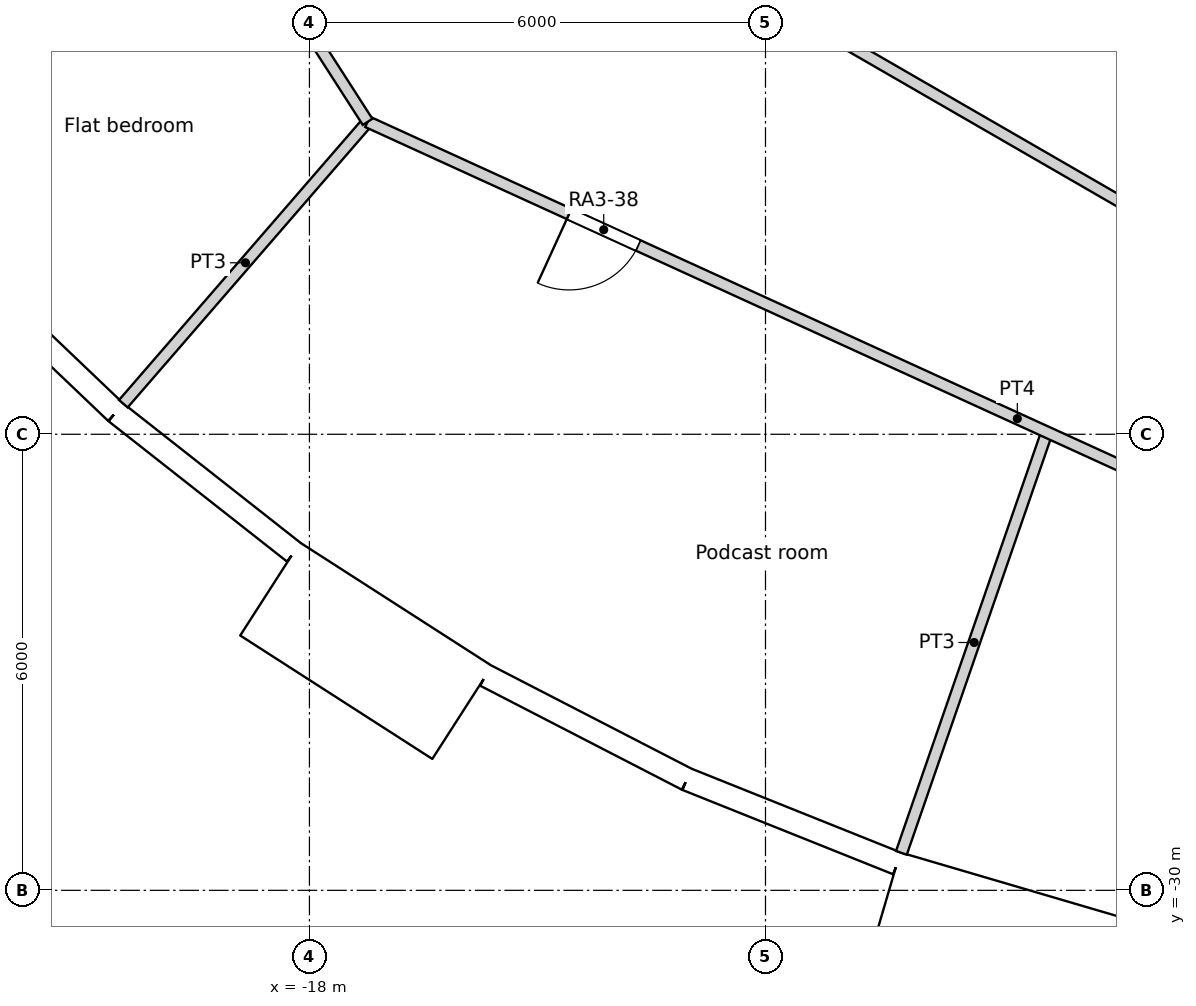
"""IFC4 building model, lengths in metres.
Left out: names, types, materials, properties, quantities, classifications, styles, units other than length and angle.
Written with IfcOpenShell. Run it as: python <this file> out.ifc"""

import sys

from ifc_helpers import new_model, si_unit, direction, frame, frame_2d, origin, origin_2d, place, context, subcontext, project, spatial, rectangle, circle, extrude, element, fill, save


model = new_model("IFC4")
c1 = context("Model", 3, precision=1e-05, world=origin(), true_north=direction((0.0, 1.0)))
c2 = subcontext(c1, "Body", "Model", "MODEL_VIEW")
j1 = project(units=[si_unit("LENGTHUNIT", "METRE"), si_unit("PLANEANGLEUNIT", "RADIAN")], contexts=[c1])
p1 = place(None, origin())
s1 = spatial("IfcSite", under=j1, at=p1, CompositionType="ELEMENT")
p2 = place(p1, origin())
s2 = spatial("IfcBuilding", under=s1, at=p2, CompositionType="ELEMENT")
p3 = place(p2, frame((0.0, 0.0, 49.8)))
s3 = spatial("IfcBuildingStorey", under=s2, at=p3, CompositionType="ELEMENT", Elevation=49.8)
for number, where, z_axis, x_axis in (
    (1, (-19.826, -22.88, 0.0), (0.0, 0.0, 1.0), (1.0, 0.0, 0.0)),
    (2, (-15.137, -26.219, 0.0), (0.0, 0.0, 1.0), (1.0, 0.0, 0.0)),
    (3, (-9.902, -28.61, 0.0), (0.0, 0.0, 1.0), (1.0, 0.0, 0.0)),
):
    element("IfcColumn", number, at=place(p3, frame(where, z_axis=z_axis, x_axis=x_axis)), inside=s3, PredefinedType="COLUMN", context=c2, shape_type="SweptSolid", body=[
        extrude(circle(Radius=0.7, at=origin_2d()), origin(), (0.0, 0.0, 1.0), 3.6),
    ])
for number, where, z_axis, x_axis in (
    (4, (-12.274, -21.259, 0.0), (0.0, 0.0, 1.0), (1.0, 0.0, 0.0)),
    (5, (-7.04, -23.516, 0.0), (0.0, 0.0, 1.0), (1.0, 0.0, 0.0)),
):
    element("IfcColumn", number, at=place(p3, frame(where, z_axis=z_axis, x_axis=x_axis)), inside=s3, PredefinedType="COLUMN", context=c2, shape_type="SweptSolid", body=[
        extrude(circle(Radius=0.75, at=origin_2d()), origin(), (0.0, 0.0, 1.0), 3.6),
    ])
p4 = place(p3, frame((-22.702, -21.655, 0.0), z_axis=(0.0, 0.0, 1.0), x_axis=(0.723744206617, -0.690068346896, 0.0)))
e6 = element("IfcWall", 6, at=p4, inside=s3, PredefinedType="SOLIDWALL", context=c2, shape_type="SweptSolid", body=[
    extrude(rectangle(XDim=2.98, YDim=0.3, at=frame_2d((1.49, 0.0))), origin(), (0.0, 0.0, 1.0), 3.15),
])
p5 = place(p4, frame((1.49, 0.0, 1.55)))
e7 = element("IfcOpeningElement", 7, at=p5, cuts=e6, PredefinedType="OPENING", context=c2, shape_type="SweptSolid", body=[
    extrude(circle(Radius=0.9, at=origin_2d()), frame((0.0, 0.16, 0.0), z_axis=(0.0, -1.0, 0.0), x_axis=(1.0, 0.0, 0.0)), (0.0, 0.0, 1.0), 0.32),
])
p6 = place(p3, frame((-20.546, -23.711, 0.0), z_axis=(0.0, 0.0, 1.0), x_axis=(0.786045331304, -0.618168858108, 0.0)))
e8 = element("IfcWall", 8, at=p6, inside=s3, PredefinedType="SOLIDWALL", context=c2, shape_type="SweptSolid", body=[
    extrude(rectangle(XDim=2.98, YDim=0.3, at=frame_2d((1.49, 0.0))), origin(), (0.0, 0.0, 1.0), 3.15),
])
p7 = place(p6, frame((1.49, 0.0, 1.55)))
e9 = element("IfcOpeningElement", 9, at=p7, cuts=e8, PredefinedType="OPENING", context=c2, shape_type="SweptSolid", body=[
    extrude(circle(Radius=0.9, at=origin_2d()), frame((0.0, 0.16, 0.0), z_axis=(0.0, -1.0, 0.0), x_axis=(1.0, 0.0, 0.0)), (0.0, 0.0, 1.0), 0.32),
])
p8 = place(p3, frame((-18.516, -26.037, -0.45), z_axis=(0.0, 0.0, 1.0), x_axis=(0.841223422347, -0.540687667415, 0.0)))
e10 = element("IfcWall", 10, at=p8, inside=s3, PredefinedType="ELEMENTEDWALL", context=c2, shape_type="SweptSolid", body=[
    extrude(rectangle(XDim=3.0, YDim=1.45, at=frame_2d((1.5, 0.0))), origin(), (0.0, 0.0, 1.0), 3.6),
])
p9 = place(p8, frame((1.5, 0.0, 2.0)))
e11 = element("IfcOpeningElement", 11, at=p9, cuts=e10, PredefinedType="OPENING", context=c2, shape_type="SweptSolid", body=[
    extrude(circle(Radius=0.9, at=origin_2d()), frame((0.0, 0.735, 0.0), z_axis=(0.0, -1.0, 0.0), x_axis=(1.0, 0.0, 0.0)), (0.0, 0.0, 1.0), 1.47),
])
p10 = place(p3, frame((-15.682, -27.174, 0.0), z_axis=(0.0, 0.0, 1.0), x_axis=(0.888819853856, -0.458256770153, 0.0)))
e12 = element("IfcWall", 12, at=p10, inside=s3, PredefinedType="SOLIDWALL", context=c2, shape_type="SweptSolid", body=[
    extrude(rectangle(XDim=2.98, YDim=0.3, at=frame_2d((1.49, 0.0))), origin(), (0.0, 0.0, 1.0), 3.15),
])
p11 = place(p10, frame((1.49, 0.0, 1.55)))
e13 = element("IfcOpeningElement", 13, at=p11, cuts=e12, PredefinedType="OPENING", context=c2, shape_type="SweptSolid", body=[
    extrude(circle(Radius=0.9, at=origin_2d()), frame((0.0, 0.16, 0.0), z_axis=(0.0, -1.0, 0.0), x_axis=(1.0, 0.0, 0.0)), (0.0, 0.0, 1.0), 0.32),
])
p12 = place(p3, frame((-13.033, -28.539, 0.0), z_axis=(0.0, 0.0, 1.0), x_axis=(0.928403213937, -0.371574316054, 0.0)))
e14 = element("IfcWall", 14, at=p12, inside=s3, PredefinedType="SOLIDWALL", context=c2, shape_type="SweptSolid", body=[
    extrude(rectangle(XDim=2.98, YDim=0.3, at=frame_2d((1.49, 0.0))), origin(), (0.0, 0.0, 1.0), 3.15),
])
p13 = place(p12, frame((1.49, 0.0, 1.55)))
e15 = element("IfcOpeningElement", 15, at=p13, cuts=e14, PredefinedType="OPENING", context=c2, shape_type="SweptSolid", body=[
    extrude(circle(Radius=0.9, at=origin_2d()), frame((0.0, 0.16, 0.0), z_axis=(0.0, -1.0, 0.0), x_axis=(1.0, 0.0, 0.0)), (0.0, 0.0, 1.0), 0.32),
])
p14 = place(p3, frame((-10.43, -30.198, -0.45), z_axis=(0.0, 0.0, 1.0), x_axis=(0.959489813418, -0.281743319258, 0.0)))
e16 = element("IfcWall", 16, at=p14, inside=s3, PredefinedType="ELEMENTEDWALL", context=c2, shape_type="SweptSolid", body=[
    extrude(rectangle(XDim=3.0, YDim=1.45, at=frame_2d((1.5, 0.0))), origin(), (0.0, 0.0, 1.0), 3.6),
])
p15 = place(p14, frame((1.5, 0.0, 2.0)))
e17 = element("IfcOpeningElement", 17, at=p15, cuts=e16, PredefinedType="OPENING", context=c2, shape_type="SweptSolid", body=[
    extrude(circle(Radius=0.9, at=origin_2d()), frame((0.0, 0.735, 0.0), z_axis=(0.0, -1.0, 0.0), x_axis=(1.0, 0.0, 0.0)), (0.0, 0.0, 1.0), 1.47),
])
p16 = place(p3, frame((-7.391, -30.491, 0.0), z_axis=(0.0, 0.0, 1.0), x_axis=(0.981924535406, -0.189272836848, 0.0)))
e18 = element("IfcWall", 18, at=p16, inside=s3, PredefinedType="SOLIDWALL", context=c2, shape_type="SweptSolid", body=[
    extrude(rectangle(XDim=2.98, YDim=0.3, at=frame_2d((1.49, 0.0))), origin(), (0.0, 0.0, 1.0), 3.15),
])
p17 = place(p16, frame((1.49, 0.0, 1.55)))
e19 = element("IfcOpeningElement", 19, at=p17, cuts=e18, PredefinedType="OPENING", context=c2, shape_type="SweptSolid", body=[
    extrude(circle(Radius=0.9, at=origin_2d()), frame((0.0, 0.16, 0.0), z_axis=(0.0, -1.0, 0.0), x_axis=(1.0, 0.0, 0.0)), (0.0, 0.0, 1.0), 0.32),
])
p18 = place(p3, frame((-25.253, -7.415, 0.0), z_axis=(0.0, 0.0, 1.0), x_axis=(0.540667724156, -0.841236240337, 0.0)))
e20 = element("IfcWall", 20, at=p18, inside=s3, PredefinedType="PARTITIONING", context=c2, shape_type="SweptSolid", body=[
    extrude(rectangle(XDim=14.83, YDim=0.15, at=frame_2d((7.415, 0.0))), origin(), (0.0, 0.0, 1.0), 3.15),
])
p19 = place(p18, frame((5.452, 0.0, 0.0)))
e21 = element("IfcOpeningElement", 21, at=p19, cuts=e20, PredefinedType="OPENING", context=c2, shape_type="SweptSolid", body=[
    extrude(rectangle(XDim=1.0, YDim=2.1, at=frame_2d((0.5, 1.05))), frame((0.0, 0.075, 0.0), z_axis=(0.0, -1.0, 0.0), x_axis=(1.0, 0.0, 0.0)), (0.0, 0.0, 1.0), 0.15),
])
p20 = place(p3, frame((-15.96, -15.96, 0.0), z_axis=(0.0, 0.0, 1.0), x_axis=(0.866022730501, -0.500004630234, 0.0)))
e22 = element("IfcWall", 22, at=p20, inside=s3, PredefinedType="PARTITIONING", context=c2, shape_type="SweptSolid", body=[
    extrude(rectangle(XDim=11.684, YDim=0.15, at=frame_2d((5.842, 0.0))), origin(), (0.0, 0.0, 1.0), 3.15),
])
p21 = place(p3, frame((-17.235, -19.89, 0.0), z_axis=(0.0, 0.0, 1.0), x_axis=(0.909617953634, -0.415445758705, 0.0)))
e23 = element("IfcWall", 23, at=p21, inside=s3, PredefinedType="PARTITIONING", context=c2, shape_type="SweptSolid", body=[
    extrude(rectangle(XDim=14.83, YDim=0.15, at=frame_2d((7.415, 0.0))), origin(), (0.0, 0.0, 1.0), 3.15),
])
p22 = place(p21, frame((2.916, 0.0, 0.0)))
e24 = element("IfcOpeningElement", 24, at=p22, cuts=e23, PredefinedType="OPENING", context=c2, shape_type="SweptSolid", body=[
    extrude(rectangle(XDim=1.0, YDim=2.04, at=frame_2d((0.5, 1.02))), frame((0.0, 0.075, 0.0), z_axis=(0.0, -1.0, 0.0), x_axis=(1.0, 0.0, 0.0)), (0.0, 0.0, 1.0), 0.15),
])
p23 = place(p3, frame((-20.448, -23.598, 0.0), z_axis=(0.0, 0.0, 1.0), x_axis=(0.654847179409, 0.755761319214, 0.0)))
e25 = element("IfcWall", 25, at=p23, inside=s3, PredefinedType="PARTITIONING", context=c2, shape_type="SweptSolid", body=[
    extrude(rectangle(XDim=4.906, YDim=0.15, at=frame_2d((2.453, 0.0))), origin(), (0.0, 0.0, 1.0), 3.15),
])
p24 = place(p3, frame((-10.212, -29.507, 0.0), z_axis=(0.0, 0.0, 1.0), x_axis=(0.32692444056, 0.94505048022, 0.0)))
e26 = element("IfcWall", 26, at=p24, inside=s3, PredefinedType="PARTITIONING", context=c2, shape_type="SweptSolid", body=[
    extrude(rectangle(XDim=5.857, YDim=0.15, at=frame_2d((2.928, 0.0))), origin(), (0.0, 0.0, 1.0), 3.15),
])
p25 = place(p5, origin())
e27 = element("IfcWindow", 27, at=p25, inside=s3, PartitioningType="SINGLE_PANEL", PredefinedType="WINDOW", context=c2, shape_type="SweptSolid", body=[
    extrude(circle(Radius=0.9, at=origin_2d()), frame((0.0, 0.12, 0.0), z_axis=(0.0, -1.0, 0.0), x_axis=(1.0, 0.0, 0.0)), (0.0, 0.0, 1.0), 0.1),
])
fill(e7, e27)
p26 = place(p7, origin())
e28 = element("IfcWindow", 28, at=p26, inside=s3, PartitioningType="SINGLE_PANEL", PredefinedType="WINDOW", context=c2, shape_type="SweptSolid", body=[
    extrude(circle(Radius=0.9, at=origin_2d()), frame((0.0, 0.12, 0.0), z_axis=(0.0, -1.0, 0.0), x_axis=(1.0, 0.0, 0.0)), (0.0, 0.0, 1.0), 0.1),
])
fill(e9, e28)
p27 = place(p9, origin())
e29 = element("IfcWindow", 29, at=p27, inside=s3, PartitioningType="SINGLE_PANEL", PredefinedType="WINDOW", context=c2, shape_type="SweptSolid", body=[
    extrude(circle(Radius=0.9, at=origin_2d()), frame((0.0, 0.695, 0.0), z_axis=(0.0, -1.0, 0.0), x_axis=(1.0, 0.0, 0.0)), (0.0, 0.0, 1.0), 0.1),
])
fill(e11, e29)
p28 = place(p11, origin())
e30 = element("IfcWindow", 30, at=p28, inside=s3, PartitioningType="SINGLE_PANEL", PredefinedType="WINDOW", context=c2, shape_type="SweptSolid", body=[
    extrude(circle(Radius=0.9, at=origin_2d()), frame((0.0, 0.12, 0.0), z_axis=(0.0, -1.0, 0.0), x_axis=(1.0, 0.0, 0.0)), (0.0, 0.0, 1.0), 0.1),
])
fill(e13, e30)
p29 = place(p13, origin())
e31 = element("IfcWindow", 31, at=p29, inside=s3, PartitioningType="SINGLE_PANEL", PredefinedType="WINDOW", context=c2, shape_type="SweptSolid", body=[
    extrude(circle(Radius=0.9, at=origin_2d()), frame((0.0, 0.12, 0.0), z_axis=(0.0, -1.0, 0.0), x_axis=(1.0, 0.0, 0.0)), (0.0, 0.0, 1.0), 0.1),
])
fill(e15, e31)
p30 = place(p15, origin())
e32 = element("IfcWindow", 32, at=p30, inside=s3, PartitioningType="SINGLE_PANEL", PredefinedType="WINDOW", context=c2, shape_type="SweptSolid", body=[
    extrude(circle(Radius=0.9, at=origin_2d()), frame((0.0, 0.695, 0.0), z_axis=(0.0, -1.0, 0.0), x_axis=(1.0, 0.0, 0.0)), (0.0, 0.0, 1.0), 0.1),
])
fill(e17, e32)
p31 = place(p22, origin())
e33 = element("IfcDoor", 33, at=p31, inside=s3, OperationType="SINGLE_SWING_RIGHT", PredefinedType="DOOR", context=c2, shape_type="SweptSolid", body=[
    extrude(rectangle(XDim=1.0, YDim=2.04, at=frame_2d((0.5, 1.02))), frame((0.0, 0.025, 0.0), z_axis=(0.0, -1.0, 0.0), x_axis=(1.0, 0.0, 0.0)), (0.0, 0.0, 1.0), 0.05),
])
fill(e24, e33)
save(model, sys.argv[1])
